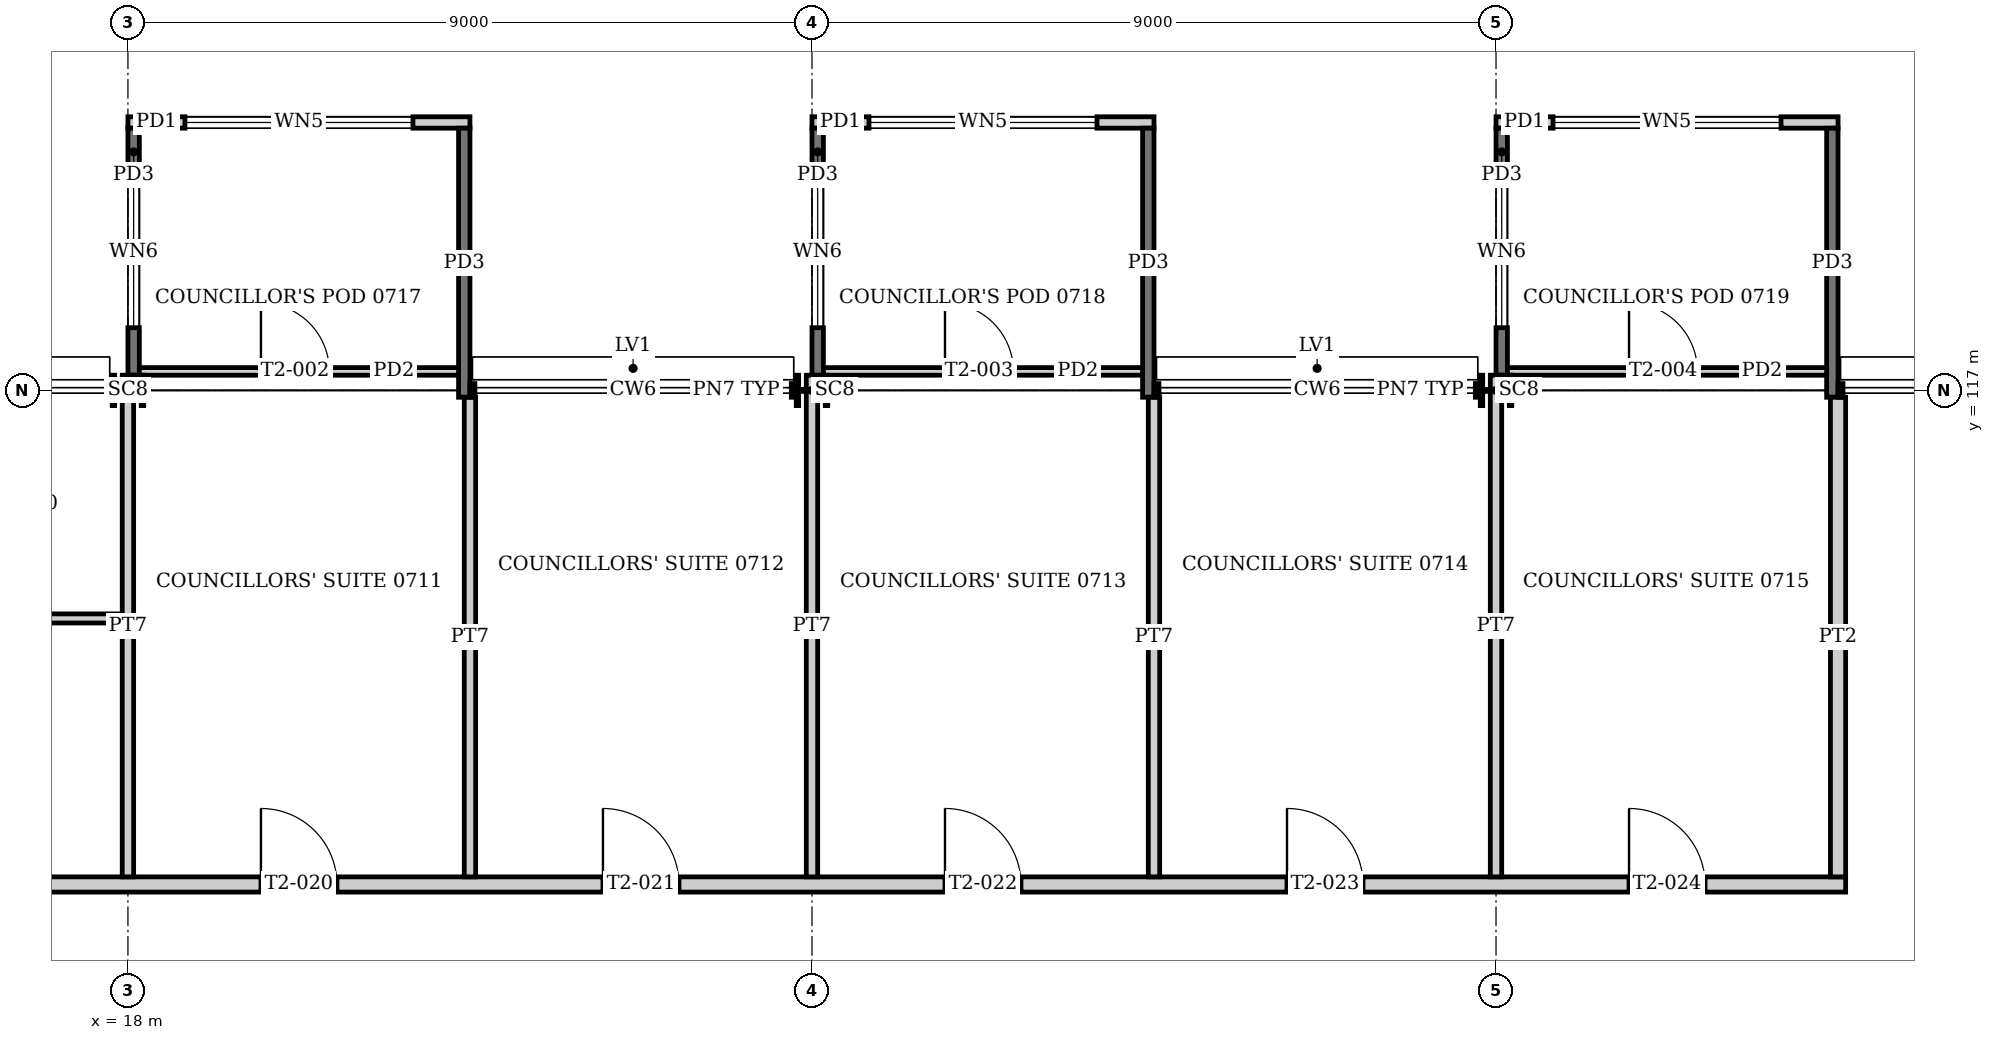
"""IFC4 building model, lengths in metres.
Left out: names, types, materials, properties, quantities, classifications, styles, units other than length and angle.
Written with IfcOpenShell. Run it as: python <this file> out.ifc"""

import sys

from ifc_helpers import new_model, si_unit, direction, frame, frame_2d, origin, origin_2d, place, context, subcontext, project, spatial, rectangle, i_section, extrude, element, fill, save


model = new_model("IFC4")
c1 = context("Model", 3, precision=1e-05, world=origin(), true_north=direction((0.0, 1.0)))
c2 = subcontext(c1, "Body", "Model", "MODEL_VIEW")
j1 = project(units=[si_unit("LENGTHUNIT", "METRE"), si_unit("PLANEANGLEUNIT", "RADIAN")], contexts=[c1])
p1 = place(None, origin())
s1 = spatial("IfcSite", under=j1, at=p1, CompositionType="ELEMENT")
p2 = place(p1, origin())
s2 = spatial("IfcBuilding", under=s1, at=p2, CompositionType="ELEMENT")
p3 = place(p2, frame((0.0, 0.0, 31.2)))
s3 = spatial("IfcBuildingStorey", under=s2, at=p3, CompositionType="ELEMENT", Elevation=31.2)
for number, where, z_axis, x_axis in (
    (1, (18.0, 117.0, 0.0), (0.0, 0.0, 1.0), (0.0, 1.0, 0.0)),
    (2, (27.0, 117.0, 0.0), (0.0, 0.0, 1.0), (0.0, 1.0, 0.0)),
    (3, (36.0, 117.0, 0.0), (0.0, 0.0, 1.0), (0.0, 1.0, 0.0)),
):
    element("IfcColumn", number, at=place(p3, frame(where, z_axis=z_axis, x_axis=x_axis)), inside=s3, PredefinedType="COLUMN", context=c2, shape_type="SweptSolid", body=[
        extrude(i_section(OverallWidth=0.4, OverallDepth=0.414, WebThickness=0.025, FlangeThickness=0.032, at=origin_2d()), origin(), (0.0, 0.0, 1.0), 4.0),
    ])
p4 = place(p3, frame((18.0, 120.525, 0.0), z_axis=(0.0, 0.0, 1.0), x_axis=(1.0, 0.0, 0.0)))
e4 = element("IfcWall", 4, at=p4, inside=s3, PredefinedType="SOLIDWALL", context=c2, shape_type="SweptSolid", body=[
    extrude(rectangle(XDim=4.5, YDim=0.15, at=frame_2d((2.25, 0.0))), origin(), (0.0, 0.0, 1.0), 2.6),
])
p5 = place(p4, frame((0.75, 0.0, 0.9)))
e5 = element("IfcOpeningElement", 5, at=p5, cuts=e4, PredefinedType="OPENING", context=c2, shape_type="SweptSolid", body=[
    extrude(rectangle(XDim=3.0, YDim=1.4, at=frame_2d((1.5, 0.7))), frame((0.0, 0.085, 0.0), z_axis=(0.0, -1.0, 0.0), x_axis=(1.0, 0.0, 0.0)), (0.0, 0.0, 1.0), 0.17),
])
p6 = place(p3, frame((18.075, 120.45, -0.15), z_axis=(0.0, 0.0, 1.0), x_axis=(0.0, -1.0, 0.0)))
e6 = element("IfcWall", 6, at=p6, inside=s3, PredefinedType="SOLIDWALL", context=c2, shape_type="SweptSolid", body=[
    extrude(rectangle(XDim=3.25, YDim=0.15, at=frame_2d((1.625, 0.0))), origin(), (0.0, 0.0, 1.0), 2.75),
])
p7 = place(p6, frame((0.625, 0.0, 1.05)))
e7 = element("IfcOpeningElement", 7, at=p7, cuts=e6, PredefinedType="OPENING", context=c2, shape_type="SweptSolid", body=[
    extrude(rectangle(XDim=2.0, YDim=1.4, at=frame_2d((1.0, 0.7))), frame((0.0, 0.085, 0.0), z_axis=(0.0, -1.0, 0.0), x_axis=(1.0, 0.0, 0.0)), (0.0, 0.0, 1.0), 0.17),
])
p8 = place(p3, frame((22.425, 120.45, -0.15), z_axis=(0.0, 0.0, 1.0), x_axis=(0.0, -1.0, 0.0)))
e8 = element("IfcWall", 8, at=p8, inside=s3, PredefinedType="SOLIDWALL", context=c2, shape_type="SweptSolid", body=[
    extrude(rectangle(XDim=3.54, YDim=0.15, at=frame_2d((1.77, 0.0))), origin(), (0.0, 0.0, 1.0), 2.75),
])
p9 = place(p3, frame((18.15, 117.25, 0.0), z_axis=(0.0, 0.0, 1.0), x_axis=(1.0, 0.0, 0.0)))
e9 = element("IfcWall", 9, at=p9, inside=s3, PredefinedType="PARTITIONING", context=c2, shape_type="SweptSolid", body=[
    extrude(rectangle(XDim=4.2, YDim=0.1, at=frame_2d((2.1, 0.0))), origin(), (0.0, 0.0, 1.0), 2.6),
])
p10 = place(p9, frame((1.6, 0.0, 0.0)))
e10 = element("IfcOpeningElement", 10, at=p10, cuts=e9, PredefinedType="OPENING", context=c2, shape_type="SweptSolid", body=[
    extrude(rectangle(XDim=0.9, YDim=2.1, at=frame_2d((0.45, 1.05))), frame((0.0, 0.06, 0.0), z_axis=(0.0, -1.0, 0.0), x_axis=(1.0, 0.0, 0.0)), (0.0, 0.0, 1.0), 0.12),
])
p11 = place(p3, frame((27.0, 120.525, 0.0), z_axis=(0.0, 0.0, 1.0), x_axis=(1.0, 0.0, 0.0)))
e11 = element("IfcWall", 11, at=p11, inside=s3, PredefinedType="SOLIDWALL", context=c2, shape_type="SweptSolid", body=[
    extrude(rectangle(XDim=4.5, YDim=0.15, at=frame_2d((2.25, 0.0))), origin(), (0.0, 0.0, 1.0), 2.6),
])
p12 = place(p11, frame((0.75, 0.0, 0.9)))
e12 = element("IfcOpeningElement", 12, at=p12, cuts=e11, PredefinedType="OPENING", context=c2, shape_type="SweptSolid", body=[
    extrude(rectangle(XDim=3.0, YDim=1.4, at=frame_2d((1.5, 0.7))), frame((0.0, 0.085, 0.0), z_axis=(0.0, -1.0, 0.0), x_axis=(1.0, 0.0, 0.0)), (0.0, 0.0, 1.0), 0.17),
])
p13 = place(p3, frame((27.075, 120.45, -0.15), z_axis=(0.0, 0.0, 1.0), x_axis=(0.0, -1.0, 0.0)))
e13 = element("IfcWall", 13, at=p13, inside=s3, PredefinedType="SOLIDWALL", context=c2, shape_type="SweptSolid", body=[
    extrude(rectangle(XDim=3.25, YDim=0.15, at=frame_2d((1.625, 0.0))), origin(), (0.0, 0.0, 1.0), 2.75),
])
p14 = place(p13, frame((0.625, 0.0, 1.05)))
e14 = element("IfcOpeningElement", 14, at=p14, cuts=e13, PredefinedType="OPENING", context=c2, shape_type="SweptSolid", body=[
    extrude(rectangle(XDim=2.0, YDim=1.4, at=frame_2d((1.0, 0.7))), frame((0.0, 0.085, 0.0), z_axis=(0.0, -1.0, 0.0), x_axis=(1.0, 0.0, 0.0)), (0.0, 0.0, 1.0), 0.17),
])
p15 = place(p3, frame((31.425, 120.45, -0.15), z_axis=(0.0, 0.0, 1.0), x_axis=(0.0, -1.0, 0.0)))
e15 = element("IfcWall", 15, at=p15, inside=s3, PredefinedType="SOLIDWALL", context=c2, shape_type="SweptSolid", body=[
    extrude(rectangle(XDim=3.54, YDim=0.15, at=frame_2d((1.77, 0.0))), origin(), (0.0, 0.0, 1.0), 2.75),
])
p16 = place(p3, frame((27.15, 117.25, 0.0), z_axis=(0.0, 0.0, 1.0), x_axis=(1.0, 0.0, 0.0)))
e16 = element("IfcWall", 16, at=p16, inside=s3, PredefinedType="PARTITIONING", context=c2, shape_type="SweptSolid", body=[
    extrude(rectangle(XDim=4.2, YDim=0.1, at=frame_2d((2.1, 0.0))), origin(), (0.0, 0.0, 1.0), 2.6),
])
p17 = place(p16, frame((1.6, 0.0, 0.0)))
e17 = element("IfcOpeningElement", 17, at=p17, cuts=e16, PredefinedType="OPENING", context=c2, shape_type="SweptSolid", body=[
    extrude(rectangle(XDim=0.9, YDim=2.1, at=frame_2d((0.45, 1.05))), frame((0.0, 0.06, 0.0), z_axis=(0.0, -1.0, 0.0), x_axis=(1.0, 0.0, 0.0)), (0.0, 0.0, 1.0), 0.12),
])
p18 = place(p3, frame((36.0, 120.525, 0.0), z_axis=(0.0, 0.0, 1.0), x_axis=(1.0, 0.0, 0.0)))
e18 = element("IfcWall", 18, at=p18, inside=s3, PredefinedType="SOLIDWALL", context=c2, shape_type="SweptSolid", body=[
    extrude(rectangle(XDim=4.5, YDim=0.15, at=frame_2d((2.25, 0.0))), origin(), (0.0, 0.0, 1.0), 2.6),
])
p19 = place(p18, frame((0.75, 0.0, 0.9)))
e19 = element("IfcOpeningElement", 19, at=p19, cuts=e18, PredefinedType="OPENING", context=c2, shape_type="SweptSolid", body=[
    extrude(rectangle(XDim=3.0, YDim=1.4, at=frame_2d((1.5, 0.7))), frame((0.0, 0.085, 0.0), z_axis=(0.0, -1.0, 0.0), x_axis=(1.0, 0.0, 0.0)), (0.0, 0.0, 1.0), 0.17),
])
p20 = place(p3, frame((36.075, 120.45, -0.15), z_axis=(0.0, 0.0, 1.0), x_axis=(0.0, -1.0, 0.0)))
e20 = element("IfcWall", 20, at=p20, inside=s3, PredefinedType="SOLIDWALL", context=c2, shape_type="SweptSolid", body=[
    extrude(rectangle(XDim=3.25, YDim=0.15, at=frame_2d((1.625, 0.0))), origin(), (0.0, 0.0, 1.0), 2.75),
])
p21 = place(p20, frame((0.625, 0.0, 1.05)))
e21 = element("IfcOpeningElement", 21, at=p21, cuts=e20, PredefinedType="OPENING", context=c2, shape_type="SweptSolid", body=[
    extrude(rectangle(XDim=2.0, YDim=1.4, at=frame_2d((1.0, 0.7))), frame((0.0, 0.085, 0.0), z_axis=(0.0, -1.0, 0.0), x_axis=(1.0, 0.0, 0.0)), (0.0, 0.0, 1.0), 0.17),
])
p22 = place(p3, frame((40.425, 120.45, -0.15), z_axis=(0.0, 0.0, 1.0), x_axis=(0.0, -1.0, 0.0)))
e22 = element("IfcWall", 22, at=p22, inside=s3, PredefinedType="SOLIDWALL", context=c2, shape_type="SweptSolid", body=[
    extrude(rectangle(XDim=3.54, YDim=0.15, at=frame_2d((1.77, 0.0))), origin(), (0.0, 0.0, 1.0), 2.75),
])
p23 = place(p3, frame((36.15, 117.25, 0.0), z_axis=(0.0, 0.0, 1.0), x_axis=(1.0, 0.0, 0.0)))
e23 = element("IfcWall", 23, at=p23, inside=s3, PredefinedType="PARTITIONING", context=c2, shape_type="SweptSolid", body=[
    extrude(rectangle(XDim=4.2, YDim=0.1, at=frame_2d((2.1, 0.0))), origin(), (0.0, 0.0, 1.0), 2.6),
])
p24 = place(p23, frame((1.6, 0.0, 0.0)))
e24 = element("IfcOpeningElement", 24, at=p24, cuts=e23, PredefinedType="OPENING", context=c2, shape_type="SweptSolid", body=[
    extrude(rectangle(XDim=0.9, YDim=2.1, at=frame_2d((0.45, 1.05))), frame((0.0, 0.06, 0.0), z_axis=(0.0, -1.0, 0.0), x_axis=(1.0, 0.0, 0.0)), (0.0, 0.0, 1.0), 0.12),
])
p25 = place(p3, frame((13.4, 110.5, 0.0), z_axis=(0.0, 0.0, 1.0), x_axis=(1.0, 0.0, 0.0)))
e25 = element("IfcWall", 25, at=p25, inside=s3, PredefinedType="PARTITIONING", context=c2, shape_type="SweptSolid", body=[
    extrude(rectangle(XDim=27.2, YDim=0.2, at=frame_2d((13.6, 0.0))), origin(), (0.0, 0.0, 1.0), 3.05),
])
p26 = place(p25, frame((6.35, 0.0, 0.0)))
e26 = element("IfcOpeningElement", 26, at=p26, cuts=e25, PredefinedType="OPENING", context=c2, shape_type="SweptSolid", body=[
    extrude(rectangle(XDim=1.0, YDim=2.1, at=frame_2d((0.5, 1.05))), frame((0.0, 0.11, 0.0), z_axis=(0.0, -1.0, 0.0), x_axis=(1.0, 0.0, 0.0)), (0.0, 0.0, 1.0), 0.22),
])
p27 = place(p25, frame((10.85, 0.0, 0.0)))
e27 = element("IfcOpeningElement", 27, at=p27, cuts=e25, PredefinedType="OPENING", context=c2, shape_type="SweptSolid", body=[
    extrude(rectangle(XDim=1.0, YDim=2.1, at=frame_2d((0.5, 1.05))), frame((0.0, 0.11, 0.0), z_axis=(0.0, -1.0, 0.0), x_axis=(1.0, 0.0, 0.0)), (0.0, 0.0, 1.0), 0.22),
])
p28 = place(p25, frame((15.35, 0.0, 0.0)))
e28 = element("IfcOpeningElement", 28, at=p28, cuts=e25, PredefinedType="OPENING", context=c2, shape_type="SweptSolid", body=[
    extrude(rectangle(XDim=1.0, YDim=2.1, at=frame_2d((0.5, 1.05))), frame((0.0, 0.11, 0.0), z_axis=(0.0, -1.0, 0.0), x_axis=(1.0, 0.0, 0.0)), (0.0, 0.0, 1.0), 0.22),
])
p29 = place(p25, frame((19.85, 0.0, 0.0)))
e29 = element("IfcOpeningElement", 29, at=p29, cuts=e25, PredefinedType="OPENING", context=c2, shape_type="SweptSolid", body=[
    extrude(rectangle(XDim=1.0, YDim=2.1, at=frame_2d((0.5, 1.05))), frame((0.0, 0.11, 0.0), z_axis=(0.0, -1.0, 0.0), x_axis=(1.0, 0.0, 0.0)), (0.0, 0.0, 1.0), 0.22),
])
p30 = place(p25, frame((24.35, 0.0, 0.0)))
e30 = element("IfcOpeningElement", 30, at=p30, cuts=e25, PredefinedType="OPENING", context=c2, shape_type="SweptSolid", body=[
    extrude(rectangle(XDim=1.0, YDim=2.1, at=frame_2d((0.5, 1.05))), frame((0.0, 0.11, 0.0), z_axis=(0.0, -1.0, 0.0), x_axis=(1.0, 0.0, 0.0)), (0.0, 0.0, 1.0), 0.22),
])
p31 = place(p3, frame((13.6, 114.0, 0.0), z_axis=(0.0, 0.0, 1.0), x_axis=(1.0, 0.0, 0.0)))
e31 = element("IfcWall", 31, at=p31, inside=s3, PredefinedType="PARTITIONING", context=c2, shape_type="SweptSolid", body=[
    extrude(rectangle(XDim=4.325, YDim=0.12, at=frame_2d((2.163, 0.0))), origin(), (0.0, 0.0, 1.0), 3.05),
])
p32 = place(p3, frame((18.0, 110.6, 0.0), z_axis=(0.0, 0.0, 1.0), x_axis=(0.0, 1.0, 0.0)))
e32 = element("IfcWall", 32, at=p32, inside=s3, PredefinedType="PARTITIONING", context=c2, shape_type="SweptSolid", body=[
    extrude(rectangle(XDim=6.6, YDim=0.15, at=frame_2d((3.3, 0.0))), origin(), (0.0, 0.0, 1.0), 3.05),
])
p33 = place(p3, frame((22.5, 110.6, 0.0), z_axis=(0.0, 0.0, 1.0), x_axis=(0.0, 1.0, 0.0)))
e33 = element("IfcWall", 33, at=p33, inside=s3, PredefinedType="PARTITIONING", context=c2, shape_type="SweptSolid", body=[
    extrude(rectangle(XDim=6.31, YDim=0.15, at=frame_2d((3.155, 0.0))), origin(), (0.0, 0.0, 1.0), 3.05),
])
p34 = place(p3, frame((27.0, 110.6, 0.0), z_axis=(0.0, 0.0, 1.0), x_axis=(0.0, 1.0, 0.0)))
e34 = element("IfcWall", 34, at=p34, inside=s3, PredefinedType="PARTITIONING", context=c2, shape_type="SweptSolid", body=[
    extrude(rectangle(XDim=6.6, YDim=0.15, at=frame_2d((3.3, 0.0))), origin(), (0.0, 0.0, 1.0), 3.05),
])
p35 = place(p3, frame((31.5, 110.6, 0.0), z_axis=(0.0, 0.0, 1.0), x_axis=(0.0, 1.0, 0.0)))
e35 = element("IfcWall", 35, at=p35, inside=s3, PredefinedType="PARTITIONING", context=c2, shape_type="SweptSolid", body=[
    extrude(rectangle(XDim=6.31, YDim=0.15, at=frame_2d((3.155, 0.0))), origin(), (0.0, 0.0, 1.0), 3.05),
])
p36 = place(p3, frame((36.0, 110.6, 0.0), z_axis=(0.0, 0.0, 1.0), x_axis=(0.0, 1.0, 0.0)))
e36 = element("IfcWall", 36, at=p36, inside=s3, PredefinedType="PARTITIONING", context=c2, shape_type="SweptSolid", body=[
    extrude(rectangle(XDim=6.6, YDim=0.15, at=frame_2d((3.3, 0.0))), origin(), (0.0, 0.0, 1.0), 3.05),
])
p37 = place(p3, frame((40.5, 110.6, 0.0), z_axis=(0.0, 0.0, 1.0), x_axis=(0.0, 1.0, 0.0)))
e37 = element("IfcWall", 37, at=p37, inside=s3, PredefinedType="PARTITIONING", context=c2, shape_type="SweptSolid", body=[
    extrude(rectangle(XDim=6.31, YDim=0.2, at=frame_2d((3.155, 0.0))), origin(), (0.0, 0.0, 1.0), 3.05),
])
p38 = place(p5, origin())
e38 = element("IfcWindow", 38, at=p38, inside=s3, PartitioningType="SINGLE_PANEL", PredefinedType="WINDOW", context=c2, shape_type="SweptSolid", body=[
    extrude(rectangle(XDim=3.0, YDim=1.4, at=frame_2d((1.5, 0.7))), frame((0.0, 0.03, 0.0), z_axis=(0.0, -1.0, 0.0), x_axis=(1.0, 0.0, 0.0)), (0.0, 0.0, 1.0), 0.06),
])
fill(e5, e38)
p39 = place(p7, origin())
e39 = element("IfcWindow", 39, at=p39, inside=s3, PartitioningType="SINGLE_PANEL", PredefinedType="WINDOW", context=c2, shape_type="SweptSolid", body=[
    extrude(rectangle(XDim=2.0, YDim=1.4, at=frame_2d((1.0, 0.7))), frame((0.0, 0.03, 0.0), z_axis=(0.0, -1.0, 0.0), x_axis=(1.0, 0.0, 0.0)), (0.0, 0.0, 1.0), 0.06),
])
fill(e7, e39)
p40 = place(p10, origin())
e40 = element("IfcDoor", 40, at=p40, inside=s3, OperationType="SINGLE_SWING_LEFT", PredefinedType="DOOR", context=c2, shape_type="SweptSolid", body=[
    extrude(rectangle(XDim=0.9, YDim=2.1, at=frame_2d((0.45, 1.05))), frame((0.0, 0.025, 0.0), z_axis=(0.0, -1.0, 0.0), x_axis=(1.0, 0.0, 0.0)), (0.0, 0.0, 1.0), 0.05),
])
fill(e10, e40)
p41 = place(p12, origin())
e41 = element("IfcWindow", 41, at=p41, inside=s3, PartitioningType="SINGLE_PANEL", PredefinedType="WINDOW", context=c2, shape_type="SweptSolid", body=[
    extrude(rectangle(XDim=3.0, YDim=1.4, at=frame_2d((1.5, 0.7))), frame((0.0, 0.03, 0.0), z_axis=(0.0, -1.0, 0.0), x_axis=(1.0, 0.0, 0.0)), (0.0, 0.0, 1.0), 0.06),
])
fill(e12, e41)
p42 = place(p14, origin())
e42 = element("IfcWindow", 42, at=p42, inside=s3, PartitioningType="SINGLE_PANEL", PredefinedType="WINDOW", context=c2, shape_type="SweptSolid", body=[
    extrude(rectangle(XDim=2.0, YDim=1.4, at=frame_2d((1.0, 0.7))), frame((0.0, 0.03, 0.0), z_axis=(0.0, -1.0, 0.0), x_axis=(1.0, 0.0, 0.0)), (0.0, 0.0, 1.0), 0.06),
])
fill(e14, e42)
p43 = place(p17, origin())
e43 = element("IfcDoor", 43, at=p43, inside=s3, OperationType="SINGLE_SWING_LEFT", PredefinedType="DOOR", context=c2, shape_type="SweptSolid", body=[
    extrude(rectangle(XDim=0.9, YDim=2.1, at=frame_2d((0.45, 1.05))), frame((0.0, 0.025, 0.0), z_axis=(0.0, -1.0, 0.0), x_axis=(1.0, 0.0, 0.0)), (0.0, 0.0, 1.0), 0.05),
])
fill(e17, e43)
p44 = place(p19, origin())
e44 = element("IfcWindow", 44, at=p44, inside=s3, PartitioningType="SINGLE_PANEL", PredefinedType="WINDOW", context=c2, shape_type="SweptSolid", body=[
    extrude(rectangle(XDim=3.0, YDim=1.4, at=frame_2d((1.5, 0.7))), frame((0.0, 0.03, 0.0), z_axis=(0.0, -1.0, 0.0), x_axis=(1.0, 0.0, 0.0)), (0.0, 0.0, 1.0), 0.06),
])
fill(e19, e44)
p45 = place(p21, origin())
e45 = element("IfcWindow", 45, at=p45, inside=s3, PartitioningType="SINGLE_PANEL", PredefinedType="WINDOW", context=c2, shape_type="SweptSolid", body=[
    extrude(rectangle(XDim=2.0, YDim=1.4, at=frame_2d((1.0, 0.7))), frame((0.0, 0.03, 0.0), z_axis=(0.0, -1.0, 0.0), x_axis=(1.0, 0.0, 0.0)), (0.0, 0.0, 1.0), 0.06),
])
fill(e21, e45)
p46 = place(p24, origin())
e46 = element("IfcDoor", 46, at=p46, inside=s3, OperationType="SINGLE_SWING_LEFT", PredefinedType="DOOR", context=c2, shape_type="SweptSolid", body=[
    extrude(rectangle(XDim=0.9, YDim=2.1, at=frame_2d((0.45, 1.05))), frame((0.0, 0.025, 0.0), z_axis=(0.0, -1.0, 0.0), x_axis=(1.0, 0.0, 0.0)), (0.0, 0.0, 1.0), 0.05),
])
fill(e24, e46)
p47 = place(p26, origin())
e47 = element("IfcDoor", 47, at=p47, inside=s3, OperationType="SINGLE_SWING_LEFT", PredefinedType="DOOR", context=c2, shape_type="SweptSolid", body=[
    extrude(rectangle(XDim=1.0, YDim=2.1, at=frame_2d((0.5, 1.05))), frame((0.0, 0.025, 0.0), z_axis=(0.0, -1.0, 0.0), x_axis=(1.0, 0.0, 0.0)), (0.0, 0.0, 1.0), 0.05),
])
fill(e26, e47)
p48 = place(p27, origin())
e48 = element("IfcDoor", 48, at=p48, inside=s3, OperationType="SINGLE_SWING_LEFT", PredefinedType="DOOR", context=c2, shape_type="SweptSolid", body=[
    extrude(rectangle(XDim=1.0, YDim=2.1, at=frame_2d((0.5, 1.05))), frame((0.0, 0.025, 0.0), z_axis=(0.0, -1.0, 0.0), x_axis=(1.0, 0.0, 0.0)), (0.0, 0.0, 1.0), 0.05),
])
fill(e27, e48)
p49 = place(p28, origin())
e49 = element("IfcDoor", 49, at=p49, inside=s3, OperationType="SINGLE_SWING_LEFT", PredefinedType="DOOR", context=c2, shape_type="SweptSolid", body=[
    extrude(rectangle(XDim=1.0, YDim=2.1, at=frame_2d((0.5, 1.05))), frame((0.0, 0.025, 0.0), z_axis=(0.0, -1.0, 0.0), x_axis=(1.0, 0.0, 0.0)), (0.0, 0.0, 1.0), 0.05),
])
fill(e28, e49)
p50 = place(p29, origin())
e50 = element("IfcDoor", 50, at=p50, inside=s3, OperationType="SINGLE_SWING_LEFT", PredefinedType="DOOR", context=c2, shape_type="SweptSolid", body=[
    extrude(rectangle(XDim=1.0, YDim=2.1, at=frame_2d((0.5, 1.05))), frame((0.0, 0.025, 0.0), z_axis=(0.0, -1.0, 0.0), x_axis=(1.0, 0.0, 0.0)), (0.0, 0.0, 1.0), 0.05),
])
fill(e29, e50)
p51 = place(p30, origin())
e51 = element("IfcDoor", 51, at=p51, inside=s3, OperationType="SINGLE_SWING_LEFT", PredefinedType="DOOR", context=c2, shape_type="SweptSolid", body=[
    extrude(rectangle(XDim=1.0, YDim=2.1, at=frame_2d((0.5, 1.05))), frame((0.0, 0.025, 0.0), z_axis=(0.0, -1.0, 0.0), x_axis=(1.0, 0.0, 0.0)), (0.0, 0.0, 1.0), 0.05),
])
fill(e30, e51)
save(model, sys.argv[1])
